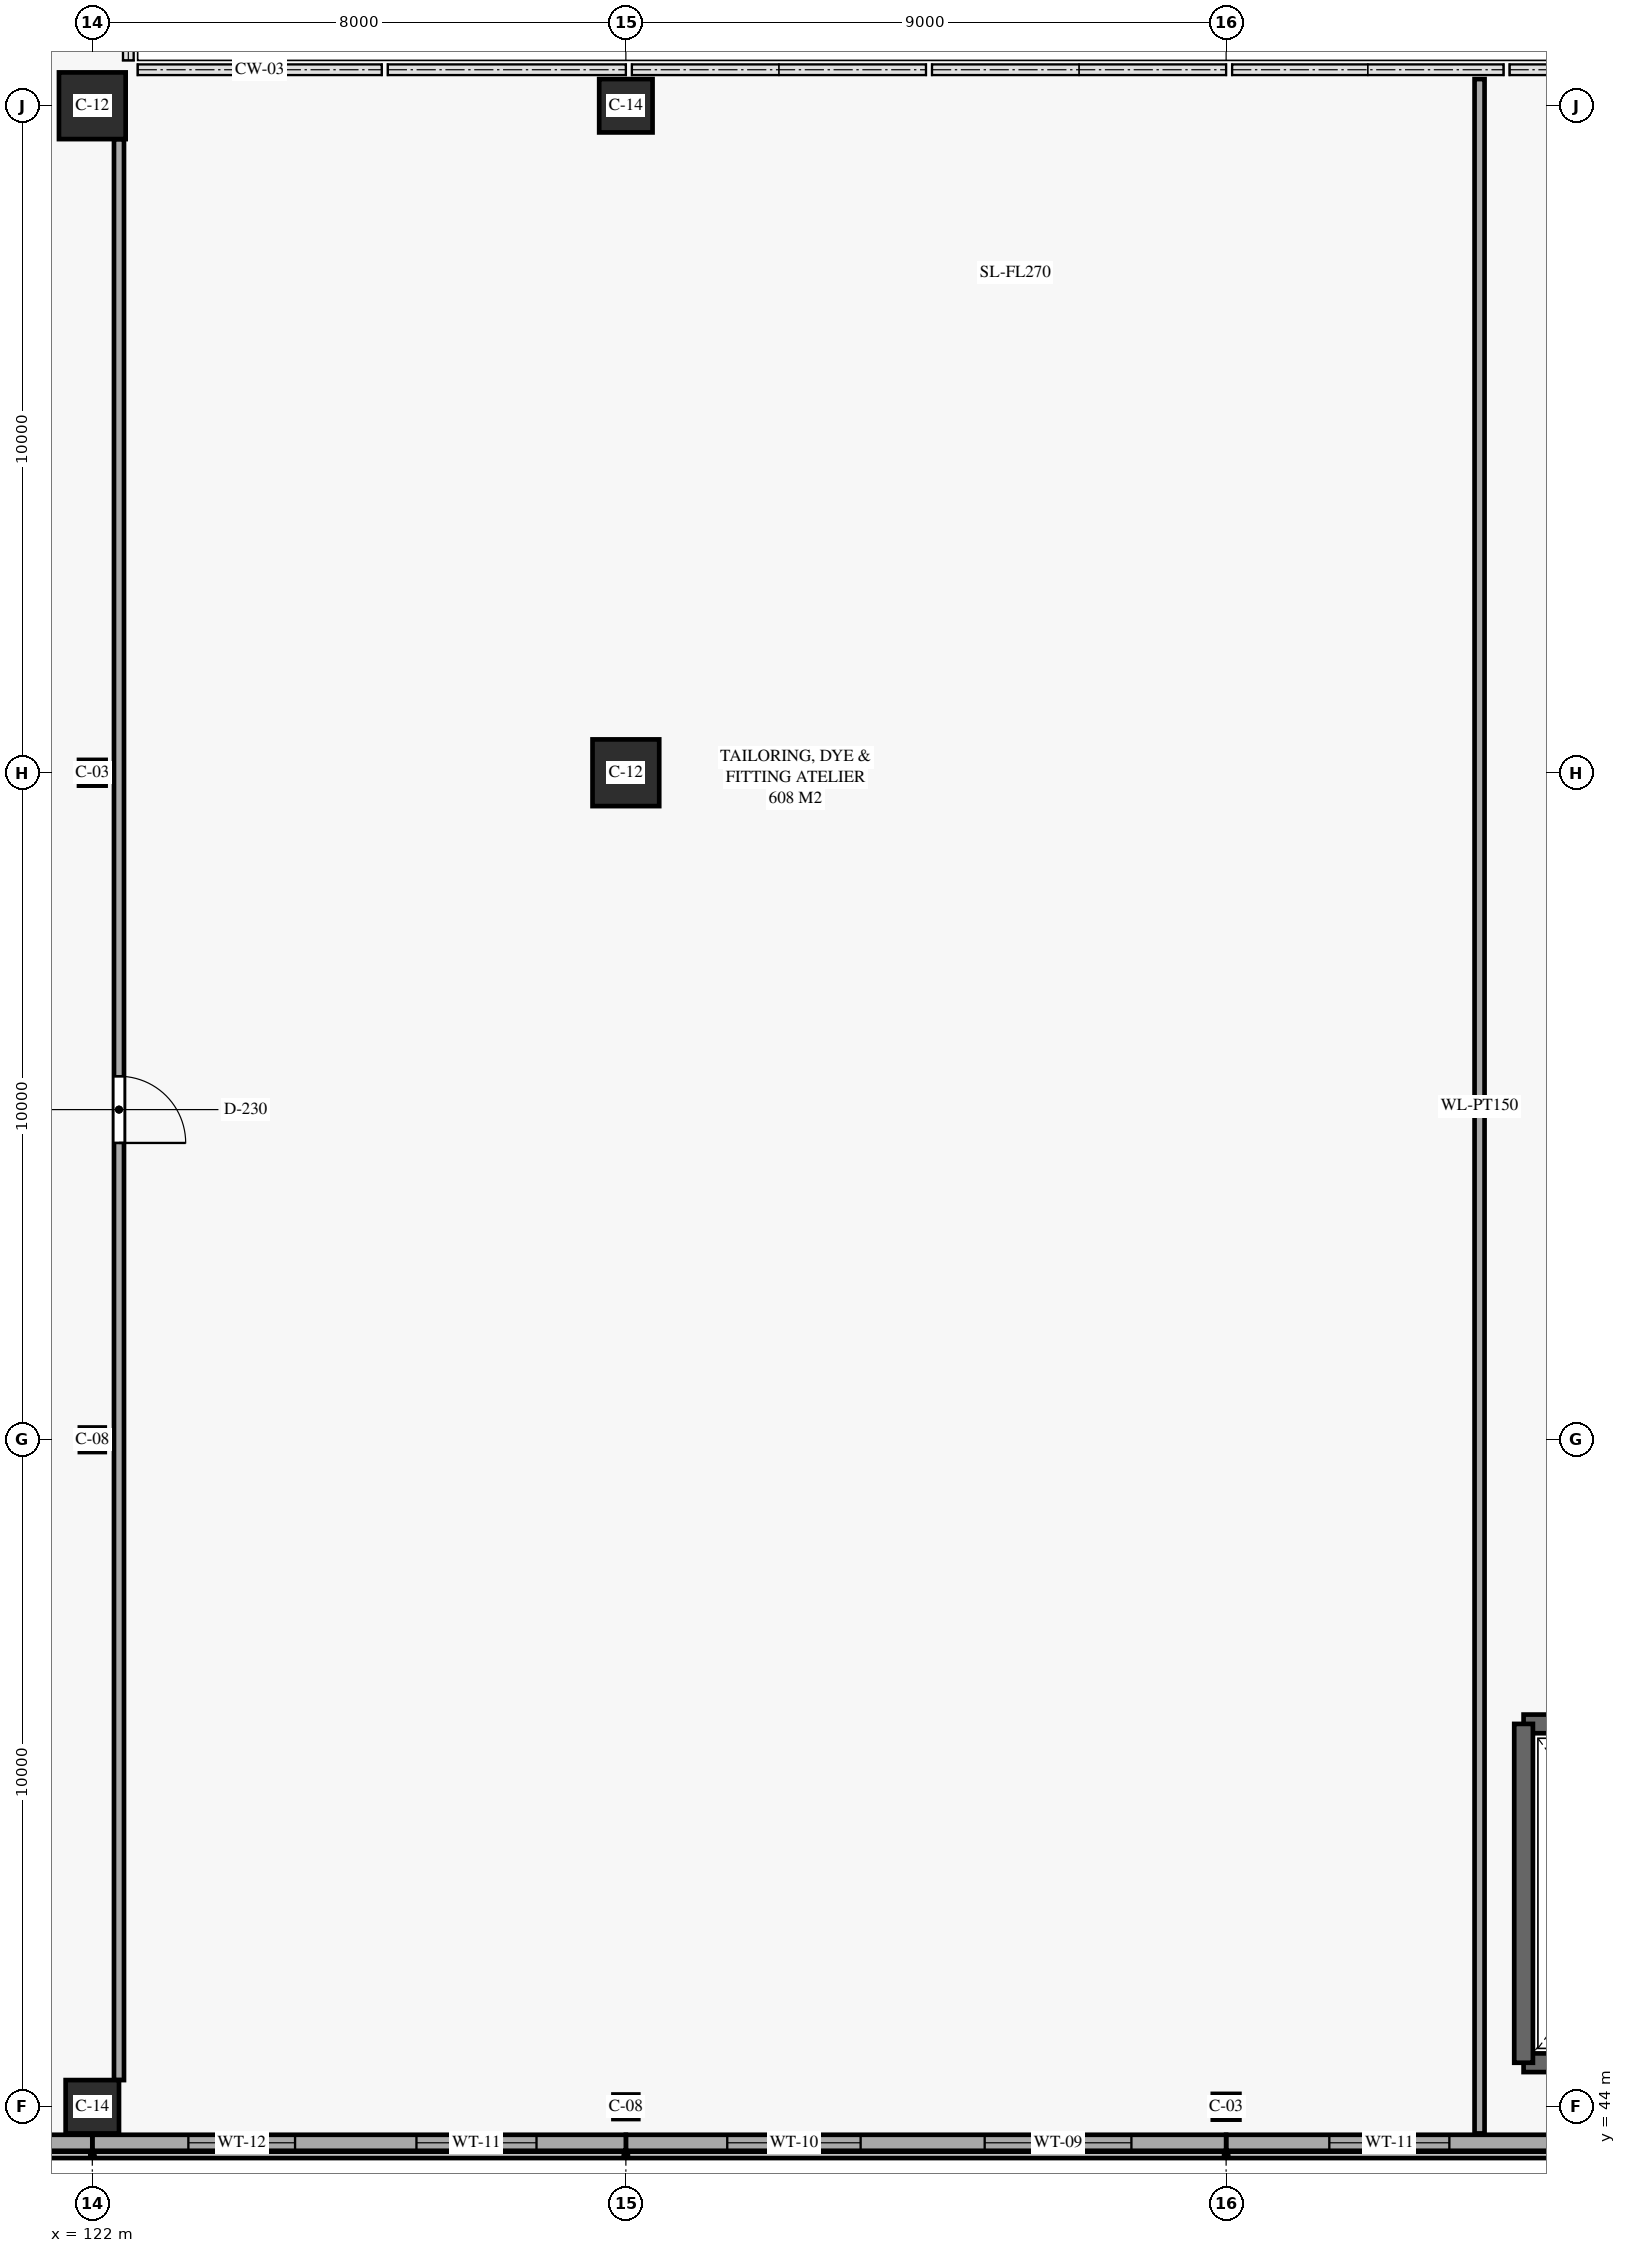
"""IFC4 building model, lengths in metres.
Left out: names, types, materials, properties, quantities, classifications, styles, units other than length and angle.
Written with IfcOpenShell. Run it as: python <this file> out.ifc"""

import sys

from ifc_helpers import new_model, si_unit, direction, frame, frame_2d, origin, origin_2d, place, context, subcontext, project, spatial, rectangle, i_section, extrude, element, fill, save


model = new_model("IFC4")
c1 = context("Model", 3, precision=1e-05, world=origin(), true_north=direction((0.0, 1.0)))
c2 = subcontext(c1, "Body", "Model", "MODEL_VIEW")
j1 = project(units=[si_unit("LENGTHUNIT", "METRE"), si_unit("PLANEANGLEUNIT", "RADIAN")], contexts=[c1])
p1 = place(None, origin())
s1 = spatial("IfcSite", under=j1, at=p1, CompositionType="ELEMENT")
p2 = place(p1, origin())
s2 = spatial("IfcBuilding", under=s1, at=p2, CompositionType="ELEMENT")
p3 = place(p2, frame((0.0, 0.0, 15.0)))
s3 = spatial("IfcBuildingStorey", under=s2, at=p3, CompositionType="ELEMENT", Elevation=15.0)
p4 = place(p3, frame((122.0, 44.0, 0.0), z_axis=(0.0, 0.0, 1.0), x_axis=(1.0, 0.0, 0.0)))
e1 = element("IfcColumn", 1, at=p4, inside=s3, PredefinedType="COLUMN", context=c2, shape_type="SweptSolid", body=[
    extrude(rectangle(XDim=0.8, YDim=0.8, at=origin_2d()), origin(), (0.0, 0.0, 1.0), 4.65),
])
p5 = place(p3, frame((122.0, 54.0, 0.0), z_axis=(0.0, 0.0, 1.0), x_axis=(1.0, 0.0, 0.0)))
e2 = element("IfcColumn", 2, at=p5, inside=s3, PredefinedType="COLUMN", context=c2, shape_type="SweptSolid", body=[
    extrude(i_section(OverallWidth=0.373, OverallDepth=0.368, WebThickness=0.015, FlangeThickness=0.024, FilletRadius=0.015, at=origin_2d()), origin(), (0.0, 0.0, 1.0), 4.65),
])
p6 = place(p3, frame((122.0, 64.0, 0.0), z_axis=(0.0, 0.0, 1.0), x_axis=(1.0, 0.0, 0.0)))
e3 = element("IfcColumn", 3, at=p6, inside=s3, PredefinedType="COLUMN", context=c2, shape_type="SweptSolid", body=[
    extrude(i_section(OverallWidth=0.399, OverallDepth=0.386, WebThickness=0.021, FlangeThickness=0.033, FilletRadius=0.016, at=origin_2d()), origin(), (0.0, 0.0, 1.0), 4.65),
])
p7 = place(p3, frame((122.0, 74.0, 0.0), z_axis=(0.0, 0.0, 1.0), x_axis=(1.0, 0.0, 0.0)))
e4 = element("IfcColumn", 4, at=p7, inside=s3, PredefinedType="COLUMN", context=c2, shape_type="SweptSolid", body=[
    extrude(rectangle(XDim=1.0, YDim=1.0, at=origin_2d()), origin(), (0.0, 0.0, 1.0), 4.65),
])
p8 = place(p3, frame((130.0, 44.0, 0.0), z_axis=(0.0, 0.0, 1.0), x_axis=(1.0, 0.0, 0.0)))
e5 = element("IfcColumn", 5, at=p8, inside=s3, PredefinedType="COLUMN", context=c2, shape_type="SweptSolid", body=[
    extrude(i_section(OverallWidth=0.373, OverallDepth=0.368, WebThickness=0.015, FlangeThickness=0.024, FilletRadius=0.015, at=origin_2d()), origin(), (0.0, 0.0, 1.0), 4.65),
])
p9 = place(p3, frame((130.0, 64.0, 0.0), z_axis=(0.0, 0.0, 1.0), x_axis=(1.0, 0.0, 0.0)))
e6 = element("IfcColumn", 6, at=p9, inside=s3, PredefinedType="COLUMN", context=c2, shape_type="SweptSolid", body=[
    extrude(rectangle(XDim=1.0, YDim=1.0, at=origin_2d()), origin(), (0.0, 0.0, 1.0), 4.65),
])
p10 = place(p3, frame((130.0, 74.0, 0.0), z_axis=(0.0, 0.0, 1.0), x_axis=(1.0, 0.0, 0.0)))
e7 = element("IfcColumn", 7, at=p10, inside=s3, PredefinedType="COLUMN", context=c2, shape_type="SweptSolid", body=[
    extrude(rectangle(XDim=0.8, YDim=0.8, at=origin_2d()), origin(), (0.0, 0.0, 1.0), 4.65),
])
p11 = place(p3, frame((139.0, 44.0, 0.0), z_axis=(0.0, 0.0, 1.0), x_axis=(1.0, 0.0, 0.0)))
e8 = element("IfcColumn", 8, at=p11, inside=s3, PredefinedType="COLUMN", context=c2, shape_type="SweptSolid", body=[
    extrude(i_section(OverallWidth=0.399, OverallDepth=0.386, WebThickness=0.021, FlangeThickness=0.033, FilletRadius=0.016, at=origin_2d()), origin(), (0.0, 0.0, 1.0), 4.65),
])
for number, where, z_axis, x_axis in (
    (9, (143.46, 44.66, 0.0), (0.0, 0.0, 1.0), (1.0, 0.0, 0.0)),
    (10, (147.34, 49.74, 0.0), (0.0, 0.0, 1.0), (-1.0, 0.0, 0.0)),
):
    element("IfcWall", number, at=place(p3, frame(where, z_axis=z_axis, x_axis=x_axis)), inside=s3, PredefinedType="SHEAR", context=c2, shape_type="SweptSolid", body=[
        extrude(rectangle(XDim=3.88, YDim=0.28, at=frame_2d((1.94, 0.0))), origin(), (0.0, 0.0, 1.0), 4.65),
    ])
p12 = place(p3, frame((143.46, 49.74, 0.0), z_axis=(0.0, 0.0, 1.0), x_axis=(0.0, -1.0, 0.0)))
e11 = element("IfcWall", 11, at=p12, inside=s3, PredefinedType="SHEAR", context=c2, shape_type="SweptSolid", body=[
    extrude(rectangle(XDim=5.08, YDim=0.28, at=frame_2d((2.54, 0.0))), origin(), (0.0, 0.0, 1.0), 4.65),
])
p13 = place(p3, frame((147.74, 43.46, 0.0), z_axis=(0.0, 0.0, 1.0), x_axis=(-1.0, 0.0, 0.0)))
e12 = element("IfcWall", 12, at=p13, inside=s3, PredefinedType="SOLIDWALL", context=c2, shape_type="SweptSolid", body=[
    extrude(rectangle(XDim=8.74, YDim=0.24, at=frame_2d((4.37, 0.0))), origin(), (0.0, 0.0, 1.0), 4.65),
])
p14 = place(p13, frame((1.847, 0.0, 0.65)))
e13 = element("IfcOpeningElement", 13, at=p14, cuts=e12, PredefinedType="OPENING", context=c2, shape_type="SweptSolid", body=[
    extrude(rectangle(XDim=1.2, YDim=2.3, at=frame_2d((0.6, 1.15))), frame((0.0, 0.13, 0.0), z_axis=(0.0, -1.0, 0.0), x_axis=(1.0, 0.0, 0.0)), (0.0, 0.0, 1.0), 0.26),
])
p15 = place(p13, frame((5.393, 0.0, 0.65)))
e14 = element("IfcOpeningElement", 14, at=p15, cuts=e12, PredefinedType="OPENING", context=c2, shape_type="SweptSolid", body=[
    extrude(rectangle(XDim=1.8, YDim=2.05, at=frame_2d((0.9, 1.025))), frame((0.0, 0.13, 0.0), z_axis=(0.0, -1.0, 0.0), x_axis=(1.0, 0.0, 0.0)), (0.0, 0.0, 1.0), 0.26),
])
p16 = place(p3, frame((139.0, 43.46, 0.0), z_axis=(0.0, 0.0, 1.0), x_axis=(-1.0, 0.0, 0.0)))
e15 = element("IfcWall", 15, at=p16, inside=s3, PredefinedType="SOLIDWALL", context=c2, shape_type="SweptSolid", body=[
    extrude(rectangle(XDim=9.0, YDim=0.24, at=frame_2d((4.5, 0.0))), origin(), (0.0, 0.0, 1.0), 4.65),
])
p17 = place(p16, frame((1.42, 0.0, 0.65)))
e16 = element("IfcOpeningElement", 16, at=p17, cuts=e15, PredefinedType="OPENING", context=c2, shape_type="SweptSolid", body=[
    extrude(rectangle(XDim=2.2, YDim=2.05, at=frame_2d((1.1, 1.025))), frame((0.0, 0.13, 0.0), z_axis=(0.0, -1.0, 0.0), x_axis=(1.0, 0.0, 0.0)), (0.0, 0.0, 1.0), 0.26),
])
p18 = place(p16, frame((5.48, 0.0, 0.65)))
e17 = element("IfcOpeningElement", 17, at=p18, cuts=e15, PredefinedType="OPENING", context=c2, shape_type="SweptSolid", body=[
    extrude(rectangle(XDim=2.0, YDim=2.05, at=frame_2d((1.0, 1.025))), frame((0.0, 0.13, 0.0), z_axis=(0.0, -1.0, 0.0), x_axis=(1.0, 0.0, 0.0)), (0.0, 0.0, 1.0), 0.26),
])
p19 = place(p3, frame((130.0, 43.46, 0.0), z_axis=(0.0, 0.0, 1.0), x_axis=(-1.0, 0.0, 0.0)))
e18 = element("IfcWall", 18, at=p19, inside=s3, PredefinedType="SOLIDWALL", context=c2, shape_type="SweptSolid", body=[
    extrude(rectangle(XDim=8.0, YDim=0.24, at=frame_2d((4.0, 0.0))), origin(), (0.0, 0.0, 1.0), 4.65),
])
p20 = place(p19, frame((1.34, 0.0, 0.65)))
e19 = element("IfcOpeningElement", 19, at=p20, cuts=e18, PredefinedType="OPENING", context=c2, shape_type="SweptSolid", body=[
    extrude(rectangle(XDim=1.8, YDim=2.05, at=frame_2d((0.9, 1.025))), frame((0.0, 0.13, 0.0), z_axis=(0.0, -1.0, 0.0), x_axis=(1.0, 0.0, 0.0)), (0.0, 0.0, 1.0), 0.26),
])
p21 = place(p19, frame((4.96, 0.0, 0.65)))
e20 = element("IfcOpeningElement", 20, at=p21, cuts=e18, PredefinedType="OPENING", context=c2, shape_type="SweptSolid", body=[
    extrude(rectangle(XDim=1.6, YDim=2.05, at=frame_2d((0.8, 1.025))), frame((0.0, 0.13, 0.0), z_axis=(0.0, -1.0, 0.0), x_axis=(1.0, 0.0, 0.0)), (0.0, 0.0, 1.0), 0.26),
])
p22 = place(p3, frame((122.0, 43.46, 0.0), z_axis=(0.0, 0.0, 1.0), x_axis=(-1.0, 0.0, 0.0)))
e21 = element("IfcWall", 21, at=p22, inside=s3, PredefinedType="SOLIDWALL", context=c2, shape_type="SweptSolid", body=[
    extrude(rectangle(XDim=7.32, YDim=0.24, at=frame_2d((3.66, 0.0))), origin(), (0.0, 0.0, 1.0), 4.65),
])
p23 = place(p22, frame((1.35, 0.0, 0.65)))
e22 = element("IfcOpeningElement", 22, at=p23, cuts=e21, PredefinedType="OPENING", context=c2, shape_type="SweptSolid", body=[
    extrude(rectangle(XDim=1.4, YDim=2.05, at=frame_2d((0.7, 1.025))), frame((0.0, 0.13, 0.0), z_axis=(0.0, -1.0, 0.0), x_axis=(1.0, 0.0, 0.0)), (0.0, 0.0, 1.0), 0.26),
])
p24 = place(p22, frame((4.67, 0.0, 0.65)))
e23 = element("IfcOpeningElement", 23, at=p24, cuts=e21, PredefinedType="OPENING", context=c2, shape_type="SweptSolid", body=[
    extrude(rectangle(XDim=1.2, YDim=2.05, at=frame_2d((0.6, 1.025))), frame((0.0, 0.13, 0.0), z_axis=(0.0, -1.0, 0.0), x_axis=(1.0, 0.0, 0.0)), (0.0, 0.0, 1.0), 0.26),
])
p25 = place(p3, frame((122.4, 73.5, 0.0), z_axis=(0.0, 0.0, 1.0), x_axis=(0.0, -1.0, 0.0)))
e24 = element("IfcWall", 24, at=p25, inside=s3, PredefinedType="PARTITIONING", context=c2, shape_type="SweptSolid", body=[
    extrude(rectangle(XDim=29.1, YDim=0.15, at=frame_2d((14.55, 0.0))), origin(), (0.0, 0.0, 1.0), 3.84),
])
p26 = place(p25, frame((14.05, 0.0, 0.0)))
e25 = element("IfcOpeningElement", 25, at=p26, cuts=e24, PredefinedType="OPENING", context=c2, shape_type="SweptSolid", body=[
    extrude(rectangle(XDim=1.0, YDim=2.15, at=frame_2d((0.5, 1.075))), frame((0.0, 0.085, 0.0), z_axis=(0.0, -1.0, 0.0), x_axis=(1.0, 0.0, 0.0)), (0.0, 0.0, 1.0), 0.17),
])
p27 = place(p3, frame((142.8, 43.6, 0.0), z_axis=(0.0, 0.0, 1.0), x_axis=(0.0, 1.0, 0.0)))
e26 = element("IfcWall", 26, at=p27, inside=s3, PredefinedType="PARTITIONING", context=c2, shape_type="SweptSolid", body=[
    extrude(rectangle(XDim=30.8, YDim=0.15, at=frame_2d((15.4, 0.0))), origin(), (0.0, 0.0, 1.0), 4.65),
])
p28 = place(p15, origin())
e27 = element("IfcWindow", 27, at=p28, inside=s3, PartitioningType="SINGLE_PANEL", PredefinedType="WINDOW", context=c2, shape_type="SweptSolid", body=[
    extrude(rectangle(XDim=1.8, YDim=2.05, at=frame_2d((0.9, 1.025))), frame((0.0, 0.03, 0.0), z_axis=(0.0, -1.0, 0.0), x_axis=(1.0, 0.0, 0.0)), (0.0, 0.0, 1.0), 0.06),
])
fill(e14, e27)
p29 = place(p17, origin())
e28 = element("IfcWindow", 28, at=p29, inside=s3, PartitioningType="SINGLE_PANEL", PredefinedType="WINDOW", context=c2, shape_type="SweptSolid", body=[
    extrude(rectangle(XDim=2.2, YDim=2.05, at=frame_2d((1.1, 1.025))), frame((0.0, 0.03, 0.0), z_axis=(0.0, -1.0, 0.0), x_axis=(1.0, 0.0, 0.0)), (0.0, 0.0, 1.0), 0.06),
])
fill(e16, e28)
p30 = place(p18, origin())
e29 = element("IfcWindow", 29, at=p30, inside=s3, PartitioningType="SINGLE_PANEL", PredefinedType="WINDOW", context=c2, shape_type="SweptSolid", body=[
    extrude(rectangle(XDim=2.0, YDim=2.05, at=frame_2d((1.0, 1.025))), frame((0.0, 0.03, 0.0), z_axis=(0.0, -1.0, 0.0), x_axis=(1.0, 0.0, 0.0)), (0.0, 0.0, 1.0), 0.06),
])
fill(e17, e29)
p31 = place(p20, origin())
e30 = element("IfcWindow", 30, at=p31, inside=s3, PartitioningType="SINGLE_PANEL", PredefinedType="WINDOW", context=c2, shape_type="SweptSolid", body=[
    extrude(rectangle(XDim=1.8, YDim=2.05, at=frame_2d((0.9, 1.025))), frame((0.0, 0.03, 0.0), z_axis=(0.0, -1.0, 0.0), x_axis=(1.0, 0.0, 0.0)), (0.0, 0.0, 1.0), 0.06),
])
fill(e19, e30)
p32 = place(p21, origin())
e31 = element("IfcWindow", 31, at=p32, inside=s3, PartitioningType="SINGLE_PANEL", PredefinedType="WINDOW", context=c2, shape_type="SweptSolid", body=[
    extrude(rectangle(XDim=1.6, YDim=2.05, at=frame_2d((0.8, 1.025))), frame((0.0, 0.03, 0.0), z_axis=(0.0, -1.0, 0.0), x_axis=(1.0, 0.0, 0.0)), (0.0, 0.0, 1.0), 0.06),
])
fill(e20, e31)
p33 = place(p26, origin())
e32 = element("IfcDoor", 32, at=p33, inside=s3, OperationType="SINGLE_SWING_RIGHT", PredefinedType="DOOR", context=c2, shape_type="SweptSolid", body=[
    extrude(rectangle(XDim=1.0, YDim=2.15, at=frame_2d((0.5, 1.075))), frame((0.0, 0.025, 0.0), z_axis=(0.0, -1.0, 0.0), x_axis=(1.0, 0.0, 0.0)), (0.0, 0.0, 1.0), 0.05),
])
fill(e25, e32)
save(model, sys.argv[1])
